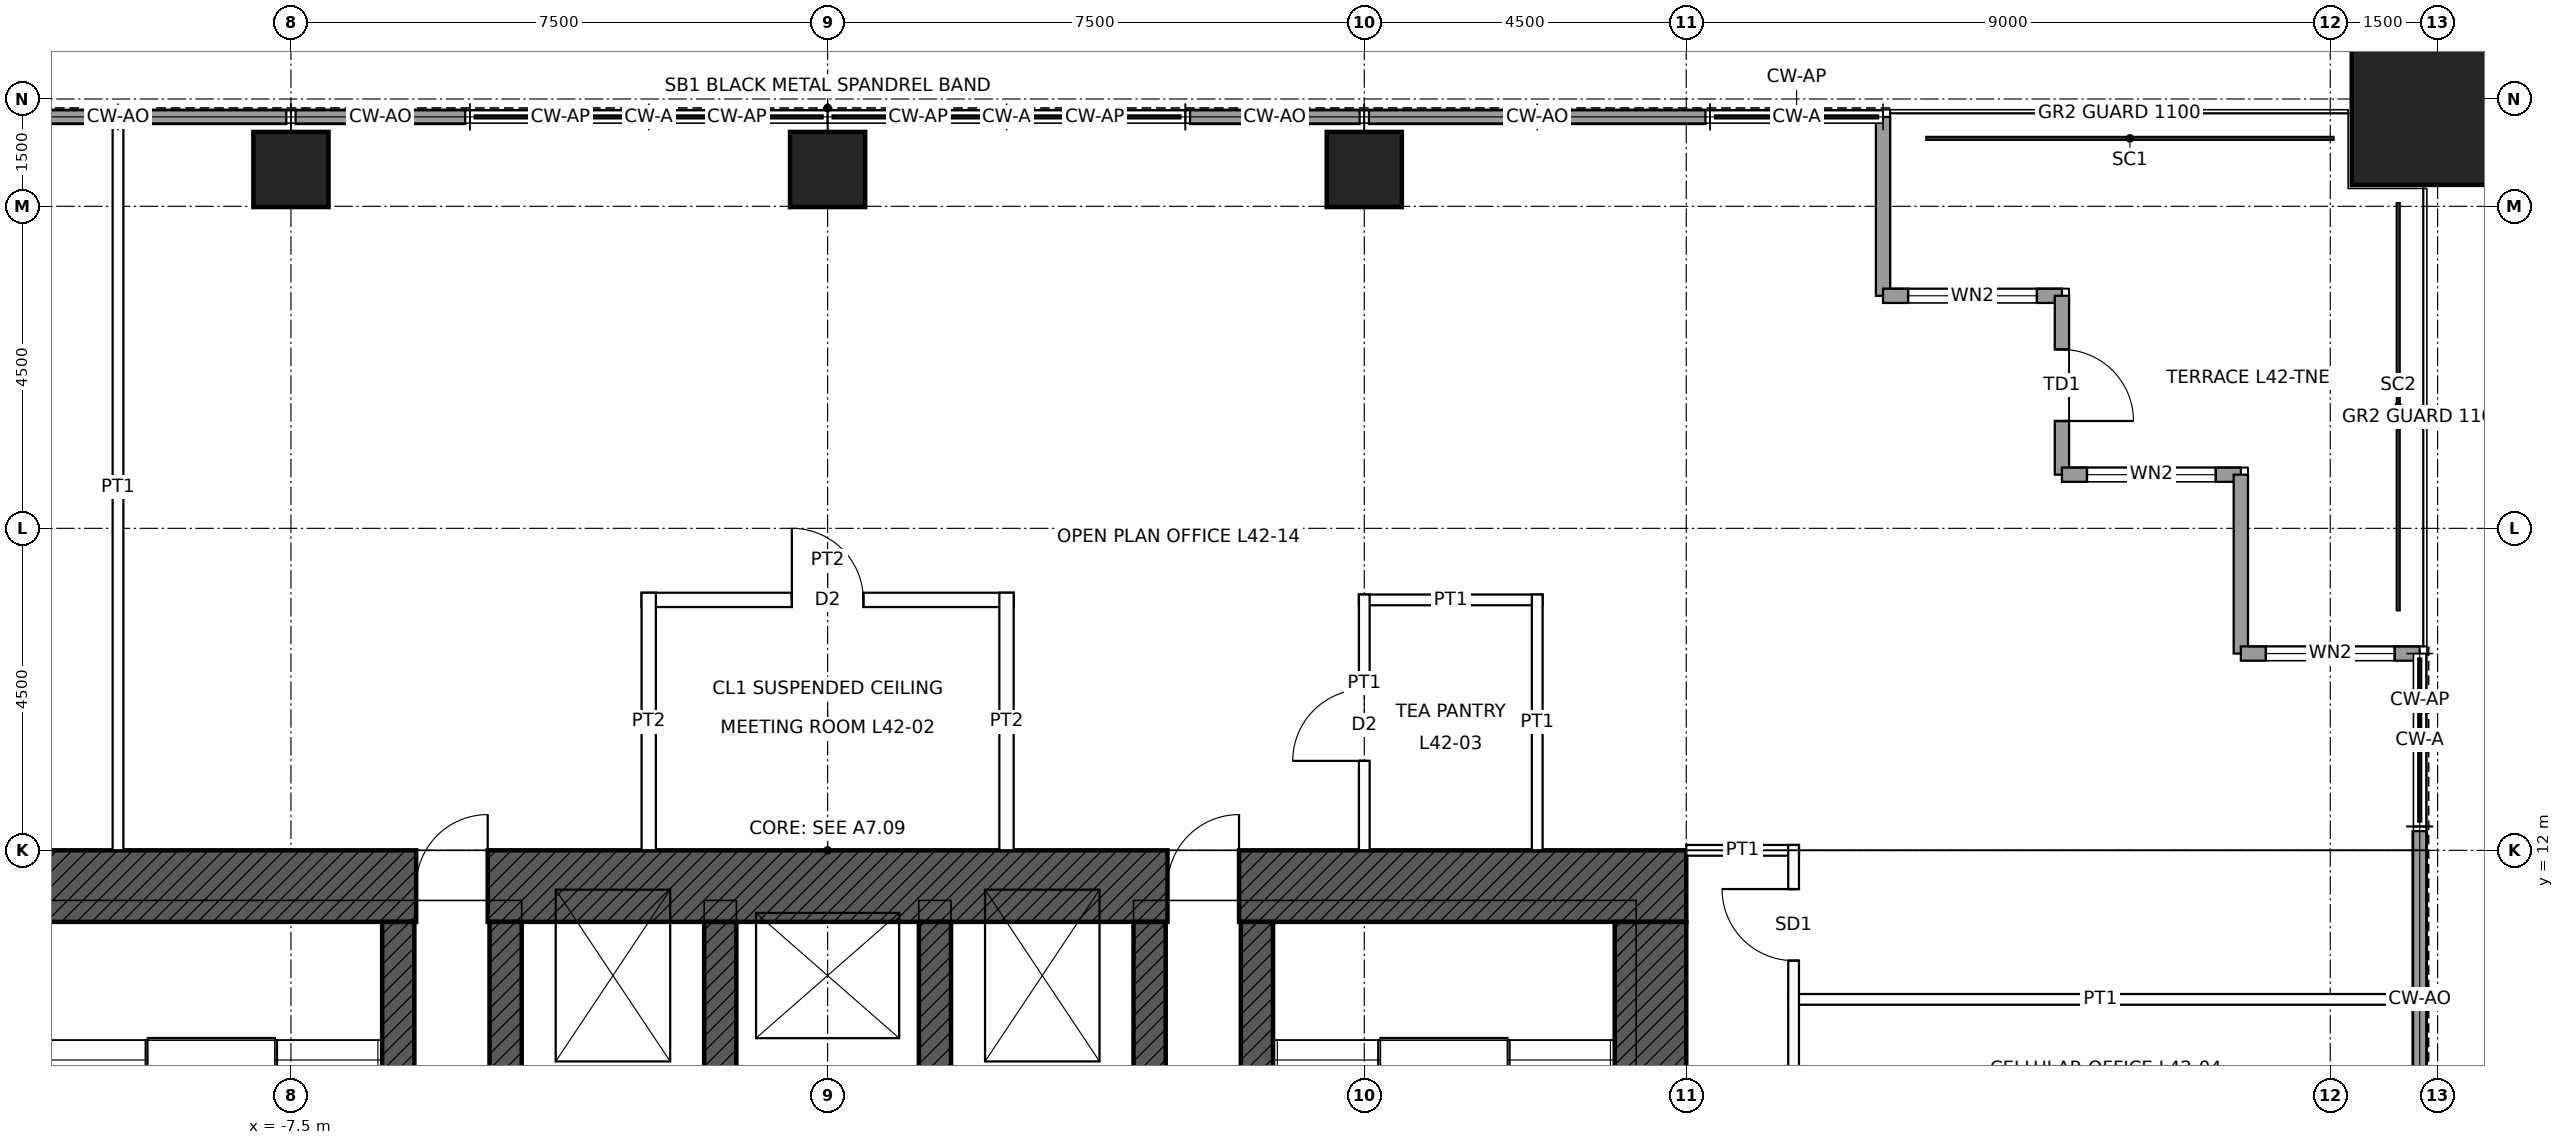
"""IFC4 building model, lengths in metres.
Left out: names, types, materials, properties, quantities, classifications, styles, units other than length and angle.
Written with IfcOpenShell. Run it as: python <this file> out.ifc"""

import sys

from ifc_helpers import new_model, si_unit, direction, frame, frame_2d, origin, origin_2d, place, context, subcontext, project, spatial, rectangle, hollow_rectangle, extrude, element, fill, save


model = new_model("IFC4")
c1 = context("Model", 3, precision=1e-05, world=origin(), true_north=direction((0.0, 1.0)))
c2 = subcontext(c1, "Body", "Model", "MODEL_VIEW")
j1 = project(units=[si_unit("LENGTHUNIT", "METRE"), si_unit("PLANEANGLEUNIT", "RADIAN")], contexts=[c1])
p1 = place(None, origin())
s1 = spatial("IfcSite", under=j1, at=p1, CompositionType="ELEMENT")
p2 = place(p1, origin())
s2 = spatial("IfcBuilding", under=s1, at=p2, CompositionType="ELEMENT")
p3 = place(p2, frame((0.0, 0.0, 201.9)))
s3 = spatial("IfcBuildingStorey", under=s2, at=p3, CompositionType="ELEMENT", Elevation=201.9)
p4 = place(p3, frame((22.5, 22.5, 0.0), z_axis=(0.0, 0.0, 1.0), x_axis=(1.0, 0.0, 0.0)))
e1 = element("IfcColumn", 1, at=p4, inside=s3, PredefinedType="COLUMN", context=c2, shape_type="SweptSolid", body=[
    extrude(hollow_rectangle(XDim=2.4, YDim=2.4, WallThickness=0.12, at=origin_2d()), origin(), (0.0, 0.0, 1.0), 4.0),
])
for number, where, z_axis, x_axis in (
    (2, (-7.5, 21.515, 0.0), (0.0, 0.0, 1.0), (1.0, 0.0, 0.0)),
    (3, (0.0, 21.515, 0.0), (0.0, 0.0, 1.0), (1.0, 0.0, 0.0)),
    (4, (7.5, 21.515, 0.0), (0.0, 0.0, 1.0), (1.0, 0.0, 0.0)),
):
    element("IfcColumn", number, at=place(p3, frame(where, z_axis=z_axis, x_axis=x_axis)), inside=s3, PredefinedType="COLUMN", context=c2, shape_type="SweptSolid", body=[
        extrude(hollow_rectangle(XDim=1.05, YDim=1.05, WallThickness=0.07, at=origin_2d()), origin(), (0.0, 0.0, 1.0), 4.0),
    ])
p5 = place(p3, frame((-12.0, 11.5, 0.0), z_axis=(0.0, 0.0, 1.0), x_axis=(1.0, 0.0, 0.0)))
e5 = element("IfcWall", 5, at=p5, inside=s3, PredefinedType="SHEAR", context=c2, shape_type="SweptSolid", body=[
    extrude(rectangle(XDim=24.0, YDim=1.0, at=frame_2d((12.0, 0.0))), origin(), (0.0, 0.0, 1.0), 4.0),
])
p6 = place(p5, frame((6.25, 0.0, 0.0)))
e6 = element("IfcOpeningElement", 6, at=p6, cuts=e5, PredefinedType="OPENING", context=c2, shape_type="SweptSolid", body=[
    extrude(rectangle(XDim=1.0, YDim=2.4, at=frame_2d((0.5, 1.2))), frame((0.0, 0.51, 0.0), z_axis=(0.0, -1.0, 0.0), x_axis=(1.0, 0.0, 0.0)), (0.0, 0.0, 1.0), 1.02),
])
p7 = place(p5, frame((16.75, 0.0, 0.0)))
e7 = element("IfcOpeningElement", 7, at=p7, cuts=e5, PredefinedType="OPENING", context=c2, shape_type="SweptSolid", body=[
    extrude(rectangle(XDim=1.0, YDim=2.4, at=frame_2d((0.5, 1.2))), frame((0.0, 0.51, 0.0), z_axis=(0.0, -1.0, 0.0), x_axis=(1.0, 0.0, 0.0)), (0.0, 0.0, 1.0), 1.02),
])
p8 = place(p3, frame((11.5, 11.0, 0.0), z_axis=(0.0, 0.0, 1.0), x_axis=(0.0, -1.0, 0.0)))
e8 = element("IfcWall", 8, at=p8, inside=s3, PredefinedType="SHEAR", context=c2, shape_type="SweptSolid", body=[
    extrude(rectangle(XDim=22.0, YDim=1.0, at=frame_2d((11.0, 0.0))), origin(), (0.0, 0.0, 1.0), 4.0),
])
p9 = place(p8, frame((10.5, 0.0, 0.0)))
e9 = element("IfcOpeningElement", 9, at=p9, cuts=e8, PredefinedType="OPENING", context=c2, shape_type="SweptSolid", body=[
    extrude(rectangle(XDim=1.0, YDim=2.4, at=frame_2d((0.5, 1.2))), frame((0.0, 0.51, 0.0), z_axis=(0.0, -1.0, 0.0), x_axis=(1.0, 0.0, 0.0)), (0.0, 0.0, 1.0), 1.02),
])
p10 = place(p3, frame((-6.0, 4.5, 0.0), z_axis=(0.0, 0.0, 1.0), x_axis=(0.0, 1.0, 0.0)))
e10 = element("IfcWall", 10, at=p10, inside=s3, PredefinedType="SHEAR", context=c2, shape_type="SweptSolid", body=[
    extrude(rectangle(XDim=6.5, YDim=0.45, at=frame_2d((3.25, 0.0))), origin(), (0.0, 0.0, 1.0), 4.0),
])
p11 = place(p10, frame((0.6, 0.0, 0.0)))
e11 = element("IfcOpeningElement", 11, at=p11, cuts=e10, PredefinedType="OPENING", context=c2, shape_type="SweptSolid", body=[
    extrude(rectangle(XDim=1.0, YDim=2.1, at=frame_2d((0.5, 1.05))), frame((0.0, 0.235, 0.0), z_axis=(0.0, -1.0, 0.0), x_axis=(1.0, 0.0, 0.0)), (0.0, 0.0, 1.0), 0.47),
])
p12 = place(p3, frame((6.0, 4.5, 0.0), z_axis=(0.0, 0.0, 1.0), x_axis=(0.0, 1.0, 0.0)))
e12 = element("IfcWall", 12, at=p12, inside=s3, PredefinedType="SHEAR", context=c2, shape_type="SweptSolid", body=[
    extrude(rectangle(XDim=6.5, YDim=0.45, at=frame_2d((3.25, 0.0))), origin(), (0.0, 0.0, 1.0), 4.0),
])
p13 = place(p12, frame((0.6, 0.0, 0.0)))
e13 = element("IfcOpeningElement", 13, at=p13, cuts=e12, PredefinedType="OPENING", context=c2, shape_type="SweptSolid", body=[
    extrude(rectangle(XDim=1.0, YDim=2.1, at=frame_2d((0.5, 1.05))), frame((0.0, 0.235, 0.0), z_axis=(0.0, -1.0, 0.0), x_axis=(1.0, 0.0, 0.0)), (0.0, 0.0, 1.0), 0.47),
])
for number, where, z_axis, x_axis in (
    (14, (-4.5, 8.5, 0.0), (0.0, 0.0, 1.0), (0.0, 1.0, 0.0)),
    (15, (4.5, 8.5, 0.0), (0.0, 0.0, 1.0), (0.0, 1.0, 0.0)),
    (16, (-1.5, 8.5, 0.0), (0.0, 0.0, 1.0), (0.0, 1.0, 0.0)),
    (17, (1.5, 8.5, 0.0), (0.0, 0.0, 1.0), (0.0, 1.0, 0.0)),
):
    element("IfcWall", number, at=place(p3, frame(where, z_axis=z_axis, x_axis=x_axis)), inside=s3, PredefinedType="SHEAR", context=c2, shape_type="SweptSolid", body=[
        extrude(rectangle(XDim=2.5, YDim=0.45, at=frame_2d((1.25, 0.0))), origin(), (0.0, 0.0, 1.0), 4.0),
    ])
p14 = place(p3, frame((14.75, 22.25, 0.0), z_axis=(0.0, 0.0, 1.0), x_axis=(0.0, -1.0, 0.0)))
e18 = element("IfcWall", 18, at=p14, inside=s3, PredefinedType="SOLIDWALL", context=c2, shape_type="SweptSolid", body=[
    extrude(rectangle(XDim=2.5, YDim=0.2, at=frame_2d((1.25, 0.0))), origin(), (0.0, 0.0, 1.0), 3.85),
])
p15 = place(p3, frame((14.75, 19.75, 0.0), z_axis=(0.0, 0.0, 1.0), x_axis=(1.0, 0.0, 0.0)))
e19 = element("IfcWall", 19, at=p15, inside=s3, PredefinedType="SOLIDWALL", context=c2, shape_type="SweptSolid", body=[
    extrude(rectangle(XDim=2.5, YDim=0.2, at=frame_2d((1.25, 0.0))), origin(), (0.0, 0.0, 1.0), 3.85),
])
p16 = place(p15, frame((0.35, 0.0, 0.3)))
e20 = element("IfcOpeningElement", 20, at=p16, cuts=e19, PredefinedType="OPENING", context=c2, shape_type="SweptSolid", body=[
    extrude(rectangle(XDim=1.8, YDim=2.4, at=frame_2d((0.9, 1.2))), frame((0.0, 0.11, 0.0), z_axis=(0.0, -1.0, 0.0), x_axis=(1.0, 0.0, 0.0)), (0.0, 0.0, 1.0), 0.22),
])
p17 = place(p3, frame((17.25, 19.75, 0.0), z_axis=(0.0, 0.0, 1.0), x_axis=(0.0, -1.0, 0.0)))
e21 = element("IfcWall", 21, at=p17, inside=s3, PredefinedType="SOLIDWALL", context=c2, shape_type="SweptSolid", body=[
    extrude(rectangle(XDim=2.5, YDim=0.2, at=frame_2d((1.25, 0.0))), origin(), (0.0, 0.0, 1.0), 3.85),
])
p18 = place(p17, frame((0.75, 0.0, 0.0)))
e22 = element("IfcOpeningElement", 22, at=p18, cuts=e21, PredefinedType="OPENING", context=c2, shape_type="SweptSolid", body=[
    extrude(rectangle(XDim=1.0, YDim=2.4, at=frame_2d((0.5, 1.2))), frame((0.0, 0.11, 0.0), z_axis=(0.0, -1.0, 0.0), x_axis=(1.0, 0.0, 0.0)), (0.0, 0.0, 1.0), 0.22),
])
p19 = place(p3, frame((17.25, 17.25, 0.0), z_axis=(0.0, 0.0, 1.0), x_axis=(1.0, 0.0, 0.0)))
e23 = element("IfcWall", 23, at=p19, inside=s3, PredefinedType="SOLIDWALL", context=c2, shape_type="SweptSolid", body=[
    extrude(rectangle(XDim=2.5, YDim=0.2, at=frame_2d((1.25, 0.0))), origin(), (0.0, 0.0, 1.0), 3.85),
])
p20 = place(p19, frame((0.35, 0.0, 0.3)))
e24 = element("IfcOpeningElement", 24, at=p20, cuts=e23, PredefinedType="OPENING", context=c2, shape_type="SweptSolid", body=[
    extrude(rectangle(XDim=1.8, YDim=2.4, at=frame_2d((0.9, 1.2))), frame((0.0, 0.11, 0.0), z_axis=(0.0, -1.0, 0.0), x_axis=(1.0, 0.0, 0.0)), (0.0, 0.0, 1.0), 0.22),
])
p21 = place(p3, frame((19.75, 17.25, 0.0), z_axis=(0.0, 0.0, 1.0), x_axis=(0.0, -1.0, 0.0)))
e25 = element("IfcWall", 25, at=p21, inside=s3, PredefinedType="SOLIDWALL", context=c2, shape_type="SweptSolid", body=[
    extrude(rectangle(XDim=2.5, YDim=0.2, at=frame_2d((1.25, 0.0))), origin(), (0.0, 0.0, 1.0), 3.85),
])
p22 = place(p3, frame((19.75, 14.75, 0.0), z_axis=(0.0, 0.0, 1.0), x_axis=(1.0, 0.0, 0.0)))
e26 = element("IfcWall", 26, at=p22, inside=s3, PredefinedType="SOLIDWALL", context=c2, shape_type="SweptSolid", body=[
    extrude(rectangle(XDim=2.5, YDim=0.2, at=frame_2d((1.25, 0.0))), origin(), (0.0, 0.0, 1.0), 3.85),
])
p23 = place(p22, frame((0.35, 0.0, 0.3)))
e27 = element("IfcOpeningElement", 27, at=p23, cuts=e26, PredefinedType="OPENING", context=c2, shape_type="SweptSolid", body=[
    extrude(rectangle(XDim=1.8, YDim=2.4, at=frame_2d((0.9, 1.2))), frame((0.0, 0.11, 0.0), z_axis=(0.0, -1.0, 0.0), x_axis=(1.0, 0.0, 0.0)), (0.0, 0.0, 1.0), 0.22),
])
for number, where, z_axis, x_axis in (
    (28, (-12.268, 22.25, 0.0), (0.0, 0.0, 1.0), (1.0, 0.0, 0.0)),
    (29, (-9.884, 22.25, 0.0), (0.0, 0.0, 1.0), (1.0, 0.0, 0.0)),
):
    element("IfcWall", number, at=place(p3, frame(where, z_axis=z_axis, x_axis=x_axis)), inside=s3, PredefinedType="SOLIDWALL", context=c2, shape_type="SweptSolid", body=[
        extrude(rectangle(XDim=2.319, YDim=0.2, at=frame_2d((1.16, 0.0))), origin(), (0.0, 0.0, 1.0), 3.85),
    ])
for number, where, z_axis, x_axis in (
    (30, (-7.435, 22.25, 0.0), (0.0, 0.0, 1.0), (1.0, 0.0, 0.0)),
    (31, (5.065, 22.25, 0.0), (0.0, 0.0, 1.0), (1.0, 0.0, 0.0)),
):
    element("IfcWall", number, at=place(p3, frame(where, z_axis=z_axis, x_axis=x_axis)), inside=s3, PredefinedType="SOLIDWALL", context=c2, shape_type="SweptSolid", body=[
        extrude(rectangle(XDim=2.37, YDim=0.2, at=frame_2d((1.185, 0.0))), origin(), (0.0, 0.0, 1.0), 3.85),
    ])
for number, where, z_axis, x_axis in (
    (32, (7.565, 22.25, 0.0), (0.0, 0.0, 1.0), (1.0, 0.0, 0.0)),
    (33, (9.949, 22.25, 0.0), (0.0, 0.0, 1.0), (1.0, 0.0, 0.0)),
    (34, (22.25, 12.268, 0.0), (0.0, 0.0, 1.0), (0.0, -1.0, 0.0)),
    (35, (22.25, 9.884, 0.0), (0.0, 0.0, 1.0), (0.0, -1.0, 0.0)),
):
    element("IfcWall", number, at=place(p3, frame(where, z_axis=z_axis, x_axis=x_axis)), inside=s3, PredefinedType="SOLIDWALL", context=c2, shape_type="SweptSolid", body=[
        extrude(rectangle(XDim=2.319, YDim=0.2, at=frame_2d((1.16, 0.0))), origin(), (0.0, 0.0, 1.0), 3.85),
    ])
p24 = place(p3, frame((13.425, 9.917, 0.0), z_axis=(0.0, 0.0, 1.0), x_axis=(1.0, 0.0, 0.0)))
e36 = element("IfcWall", 36, at=p24, inside=s3, PredefinedType="PARTITIONING", context=c2, shape_type="SweptSolid", body=[
    extrude(rectangle(XDim=8.725, YDim=0.15, at=frame_2d((4.362, 0.0))), origin(), (0.0, 0.0, 1.0), 3.85),
])
p25 = place(p3, frame((12.0, 12.0, 0.0), z_axis=(0.0, 0.0, 1.0), x_axis=(1.0, 0.0, 0.0)))
e37 = element("IfcWall", 37, at=p25, inside=s3, PredefinedType="PARTITIONING", context=c2, shape_type="SweptSolid", body=[
    extrude(rectangle(XDim=1.575, YDim=0.15, at=frame_2d((0.788, 0.0))), origin(), (0.0, 0.0, 1.0), 2.908),
])
p26 = place(p3, frame((-2.6, 15.5, 0.0), z_axis=(0.0, 0.0, 1.0), x_axis=(1.0, 0.0, 0.0)))
e38 = element("IfcWall", 38, at=p26, inside=s3, PredefinedType="PARTITIONING", context=c2, shape_type="SweptSolid", body=[
    extrude(rectangle(XDim=5.2, YDim=0.2, at=frame_2d((2.6, 0.0))), origin(), (0.0, 0.0, 1.0), 3.85),
])
p27 = place(p26, frame((2.1, 0.0, 0.0)))
e39 = element("IfcOpeningElement", 39, at=p27, cuts=e38, PredefinedType="OPENING", context=c2, shape_type="SweptSolid", body=[
    extrude(rectangle(XDim=1.0, YDim=2.1, at=frame_2d((0.5, 1.05))), frame((0.0, 0.11, 0.0), z_axis=(0.0, -1.0, 0.0), x_axis=(1.0, 0.0, 0.0)), (0.0, 0.0, 1.0), 0.22),
])
p28 = place(p3, frame((7.425, 15.5, 0.0), z_axis=(0.0, 0.0, 1.0), x_axis=(1.0, 0.0, 0.0)))
e40 = element("IfcWall", 40, at=p28, inside=s3, PredefinedType="PARTITIONING", context=c2, shape_type="SweptSolid", body=[
    extrude(rectangle(XDim=2.567, YDim=0.15, at=frame_2d((1.283, 0.0))), origin(), (0.0, 0.0, 1.0), 3.85),
])
p29 = place(p3, frame((-9.917, 12.0, 0.0), z_axis=(0.0, 0.0, 1.0), x_axis=(0.0, 1.0, 0.0)))
e41 = element("IfcWall", 41, at=p29, inside=s3, PredefinedType="PARTITIONING", context=c2, shape_type="SweptSolid", body=[
    extrude(rectangle(XDim=10.15, YDim=0.15, at=frame_2d((5.075, 0.0))), origin(), (0.0, 0.0, 1.0), 3.85),
])
for number, where, z_axis, x_axis in (
    (42, (-2.5, 12.0, 0.0), (0.0, 0.0, 1.0), (0.0, 1.0, 0.0)),
    (43, (2.5, 12.0, 0.0), (0.0, 0.0, 1.0), (0.0, 1.0, 0.0)),
):
    element("IfcWall", number, at=place(p3, frame(where, z_axis=z_axis, x_axis=x_axis)), inside=s3, PredefinedType="PARTITIONING", context=c2, shape_type="SweptSolid", body=[
        extrude(rectangle(XDim=3.6, YDim=0.2, at=frame_2d((1.8, 0.0))), origin(), (0.0, 0.0, 1.0), 3.85),
    ])
p30 = place(p3, frame((7.5, 12.0, 0.0), z_axis=(0.0, 0.0, 1.0), x_axis=(0.0, 1.0, 0.0)))
e44 = element("IfcWall", 44, at=p30, inside=s3, PredefinedType="PARTITIONING", context=c2, shape_type="SweptSolid", body=[
    extrude(rectangle(XDim=3.575, YDim=0.15, at=frame_2d((1.788, 0.0))), origin(), (0.0, 0.0, 1.0), 3.238),
])
p31 = place(p30, frame((1.25, 0.0, 0.0)))
e45 = element("IfcOpeningElement", 45, at=p31, cuts=e44, PredefinedType="OPENING", context=c2, shape_type="SweptSolid", body=[
    extrude(rectangle(XDim=1.0, YDim=2.1, at=frame_2d((0.5, 1.05))), frame((0.0, 0.085, 0.0), z_axis=(0.0, -1.0, 0.0), x_axis=(1.0, 0.0, 0.0)), (0.0, 0.0, 1.0), 0.17),
])
p32 = place(p3, frame((9.917, 12.0, 0.0), z_axis=(0.0, 0.0, 1.0), x_axis=(0.0, 1.0, 0.0)))
e46 = element("IfcWall", 46, at=p32, inside=s3, PredefinedType="PARTITIONING", context=c2, shape_type="SweptSolid", body=[
    extrude(rectangle(XDim=3.575, YDim=0.15, at=frame_2d((1.788, 0.0))), origin(), (0.0, 0.0, 1.0), 3.85),
])
p33 = place(p3, frame((13.5, -5.075, 0.0), z_axis=(0.0, 0.0, 1.0), x_axis=(0.0, 1.0, 0.0)))
e47 = element("IfcWall", 47, at=p33, inside=s3, PredefinedType="PARTITIONING", context=c2, shape_type="SweptSolid", body=[
    extrude(rectangle(XDim=17.15, YDim=0.15, at=frame_2d((8.575, 0.0))), origin(), (0.0, 0.0, 1.0), 3.85),
])
p34 = place(p33, frame((2.975, 0.0, 0.0)))
e48 = element("IfcOpeningElement", 48, at=p34, cuts=e47, PredefinedType="OPENING", context=c2, shape_type="SweptSolid", body=[
    extrude(rectangle(XDim=1.0, YDim=2.4, at=frame_2d((0.5, 1.2))), frame((0.0, 0.085, 0.0), z_axis=(0.0, -1.0, 0.0), x_axis=(1.0, 0.0, 0.0)), (0.0, 0.0, 1.0), 0.17),
])
p35 = place(p33, frame((15.533, 0.0, 0.0)))
e49 = element("IfcOpeningElement", 49, at=p35, cuts=e47, PredefinedType="OPENING", context=c2, shape_type="SweptSolid", body=[
    extrude(rectangle(XDim=1.0, YDim=2.4, at=frame_2d((0.5, 1.2))), frame((0.0, 0.085, 0.0), z_axis=(0.0, -1.0, 0.0), x_axis=(1.0, 0.0, 0.0)), (0.0, 0.0, 1.0), 0.17),
])
p36 = place(p16, origin())
e50 = element("IfcWindow", 50, at=p36, inside=s3, PartitioningType="SINGLE_PANEL", PredefinedType="WINDOW", context=c2, shape_type="SweptSolid", body=[
    extrude(rectangle(XDim=1.8, YDim=2.4, at=frame_2d((0.9, 1.2))), frame((0.0, 0.03, 0.0), z_axis=(0.0, -1.0, 0.0), x_axis=(1.0, 0.0, 0.0)), (0.0, 0.0, 1.0), 0.06),
])
fill(e20, e50)
p37 = place(p18, origin())
e51 = element("IfcDoor", 51, at=p37, inside=s3, OperationType="SINGLE_SWING_RIGHT", PredefinedType="DOOR", context=c2, shape_type="SweptSolid", body=[
    extrude(rectangle(XDim=1.0, YDim=2.4, at=frame_2d((0.5, 1.2))), frame((0.0, 0.025, 0.0), z_axis=(0.0, -1.0, 0.0), x_axis=(1.0, 0.0, 0.0)), (0.0, 0.0, 1.0), 0.05),
])
fill(e22, e51)
p38 = place(p20, origin())
e52 = element("IfcWindow", 52, at=p38, inside=s3, PartitioningType="SINGLE_PANEL", PredefinedType="WINDOW", context=c2, shape_type="SweptSolid", body=[
    extrude(rectangle(XDim=1.8, YDim=2.4, at=frame_2d((0.9, 1.2))), frame((0.0, 0.03, 0.0), z_axis=(0.0, -1.0, 0.0), x_axis=(1.0, 0.0, 0.0)), (0.0, 0.0, 1.0), 0.06),
])
fill(e24, e52)
p39 = place(p23, origin())
e53 = element("IfcWindow", 53, at=p39, inside=s3, PartitioningType="SINGLE_PANEL", PredefinedType="WINDOW", context=c2, shape_type="SweptSolid", body=[
    extrude(rectangle(XDim=1.8, YDim=2.4, at=frame_2d((0.9, 1.2))), frame((0.0, 0.03, 0.0), z_axis=(0.0, -1.0, 0.0), x_axis=(1.0, 0.0, 0.0)), (0.0, 0.0, 1.0), 0.06),
])
fill(e27, e53)
p40 = place(p6, origin())
e54 = element("IfcDoor", 54, at=p40, inside=s3, OperationType="SINGLE_SWING_RIGHT", PredefinedType="DOOR", context=c2, shape_type="SweptSolid", body=[
    extrude(rectangle(XDim=1.0, YDim=2.4, at=frame_2d((0.5, 1.2))), frame((0.0, 0.485, 0.0), z_axis=(0.0, -1.0, 0.0), x_axis=(1.0, 0.0, 0.0)), (0.0, 0.0, 1.0), 0.05),
])
fill(e6, e54)
p41 = place(p7, origin())
e55 = element("IfcDoor", 55, at=p41, inside=s3, OperationType="SINGLE_SWING_RIGHT", PredefinedType="DOOR", context=c2, shape_type="SweptSolid", body=[
    extrude(rectangle(XDim=1.0, YDim=2.4, at=frame_2d((0.5, 1.2))), frame((0.0, 0.485, 0.0), z_axis=(0.0, -1.0, 0.0), x_axis=(1.0, 0.0, 0.0)), (0.0, 0.0, 1.0), 0.05),
])
fill(e7, e55)
p42 = place(p27, origin())
e56 = element("IfcDoor", 56, at=p42, inside=s3, OperationType="SINGLE_SWING_LEFT", PredefinedType="DOOR", context=c2, shape_type="SweptSolid", body=[
    extrude(rectangle(XDim=1.0, YDim=2.1, at=frame_2d((0.5, 1.05))), frame((0.0, 0.025, 0.0), z_axis=(0.0, -1.0, 0.0), x_axis=(1.0, 0.0, 0.0)), (0.0, 0.0, 1.0), 0.05),
])
fill(e39, e56)
p43 = place(p31, origin())
e57 = element("IfcDoor", 57, at=p43, inside=s3, OperationType="SINGLE_SWING_LEFT", PredefinedType="DOOR", context=c2, shape_type="SweptSolid", body=[
    extrude(rectangle(XDim=1.0, YDim=2.1, at=frame_2d((0.5, 1.05))), frame((0.0, 0.025, 0.0), z_axis=(0.0, -1.0, 0.0), x_axis=(1.0, 0.0, 0.0)), (0.0, 0.0, 1.0), 0.05),
])
fill(e45, e57)
p44 = place(p35, origin())
e58 = element("IfcDoor", 58, at=p44, inside=s3, OperationType="SINGLE_SWING_RIGHT", PredefinedType="DOOR", context=c2, shape_type="SweptSolid", body=[
    extrude(rectangle(XDim=1.0, YDim=2.4, at=frame_2d((0.5, 1.2))), frame((0.0, 0.025, 0.0), z_axis=(0.0, -1.0, 0.0), x_axis=(1.0, 0.0, 0.0)), (0.0, 0.0, 1.0), 0.05),
])
fill(e49, e58)
save(model, sys.argv[1])
